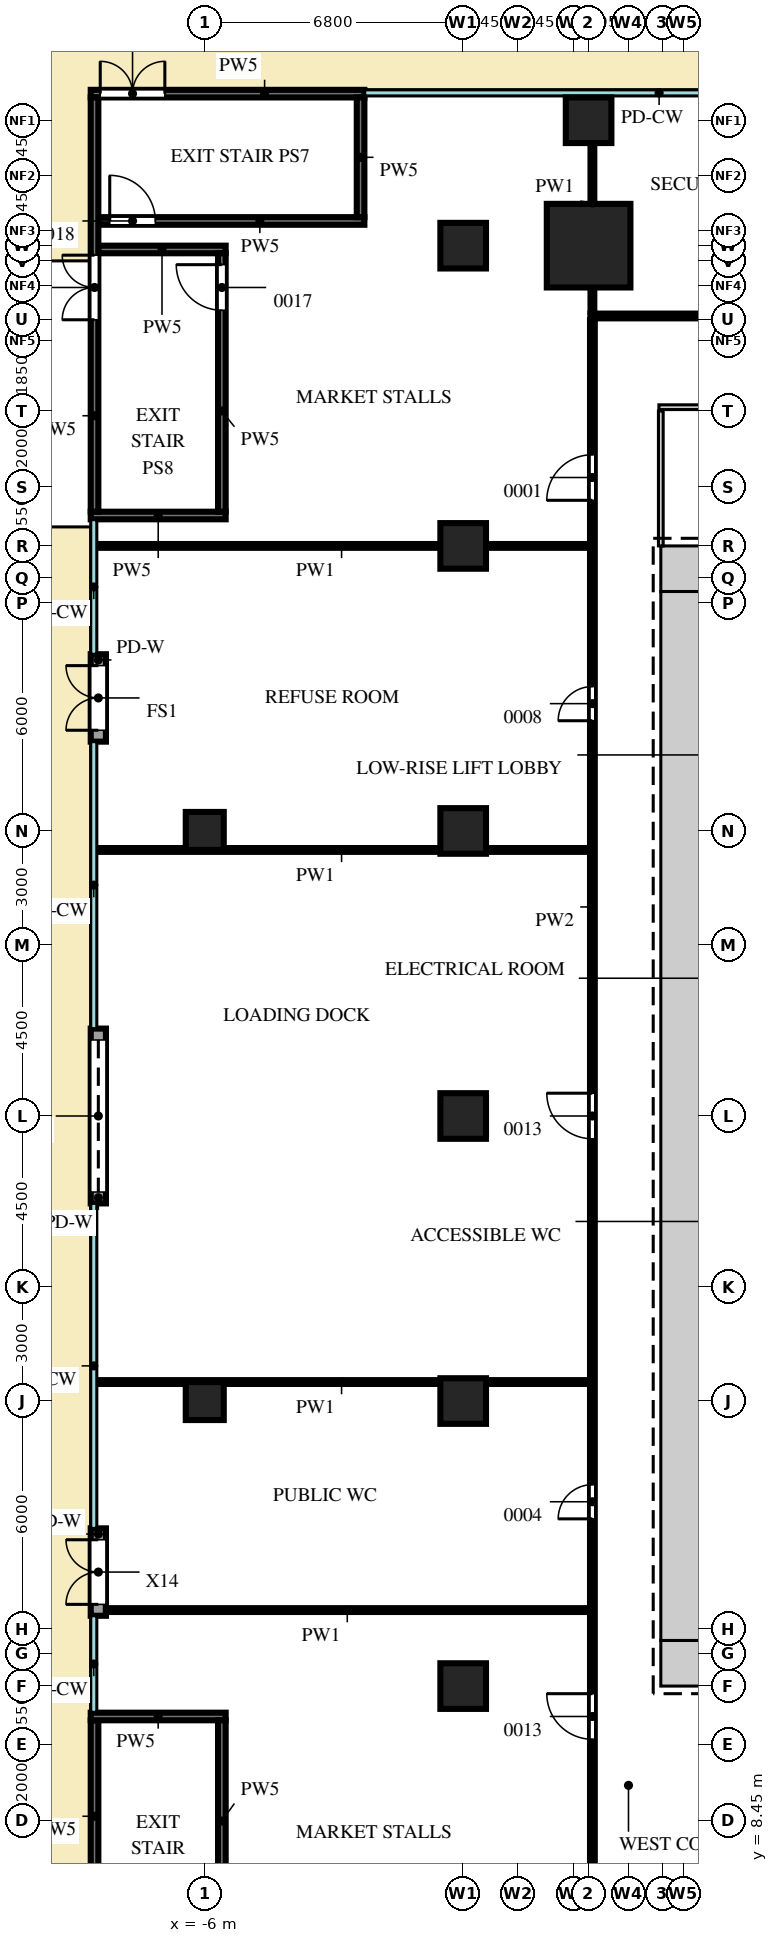
"""IFC4 building model, lengths in metres.
Left out: names, types, materials, properties, quantities, classifications, styles, units other than length and angle.
Written with IfcOpenShell. Run it as: python <this file> out.ifc"""

import sys

from ifc_helpers import new_model, si_unit, direction, frame, frame_2d, origin, origin_2d, place, context, subcontext, project, spatial, rectangle, extrude, source, transform, mapped, element, fill, save


model = new_model("IFC4")
c1 = context("Model", 3, precision=1e-05, world=origin(), true_north=direction((0.0, 1.0)))
c2 = subcontext(c1, "Body", "Model", "MODEL_VIEW")
j1 = project(units=[si_unit("LENGTHUNIT", "METRE"), si_unit("PLANEANGLEUNIT", "RADIAN")], contexts=[c1])
p1 = place(None, origin())
s1 = spatial("IfcSite", under=j1, at=p1, CompositionType="ELEMENT")
p2 = place(p1, origin())
s2 = spatial("IfcBuilding", under=s1, at=p2, CompositionType="ELEMENT")
p3 = place(p2, origin())
s3 = spatial("IfcBuildingStorey", under=s2, at=p3, CompositionType="ELEMENT", Elevation=0.0)
m1 = source(origin(), c2, "Body", "SweptSolid", [
    extrude(rectangle(XDim=1.2, YDim=1.2, at=frame_2d((0.6, 0.0))), origin(), (0.0, 0.0, 1.0), 7.2),
])
for number, where, z_axis, x_axis in (
    (1, (6.0, 41.4, 0.0), (0.0, 0.0, 1.0), (1.0, 0.0, 0.0)),
    (2, (6.0, 12.6, 0.0), (0.0, 0.0, 1.0), (1.0, 0.0, 0.0)),
):
    element("IfcWall", number, at=place(p3, frame(where, z_axis=z_axis, x_axis=x_axis)), inside=s3, PredefinedType="SHEAR", context=c2, shape_type="MappedRepresentation", body=[
        mapped(m1, transform((0.0, 0.0, 0.0))),
    ])
m2 = source(origin(), c2, "Body", "SweptSolid", [
    extrude(rectangle(XDim=27.6, YDim=1.2, at=frame_2d((13.8, 0.0))), origin(), (0.0, 0.0, 1.0), 7.2),
])
p4 = place(p3, frame((6.6, 13.2, 0.0), z_axis=(0.0, 0.0, 1.0), x_axis=(0.0, 1.0, 0.0)))
e3 = element("IfcWall", 3, at=p4, inside=s3, PredefinedType="SHEAR", context=c2, shape_type="MappedRepresentation", body=[
    mapped(m2, transform((0.0, 0.0, 0.0))),
])
m3 = source(origin(), c2, "Body", "SweptSolid", [
    extrude(rectangle(XDim=2.2, YDim=2.2, at=origin_2d()), origin(), (0.0, 0.0, 1.0), 7.2),
])
p5 = place(p3, frame((4.1, 49.9, 0.0), z_axis=(0.0, 0.0, 1.0), x_axis=(1.0, 0.0, 0.0)))
e4 = element("IfcColumn", 4, at=p5, inside=s3, PredefinedType="COLUMN", context=c2, shape_type="MappedRepresentation", body=[
    mapped(m3, transform((0.0, 0.0, 0.0))),
])
m4 = source(origin(), c2, "Body", "SweptSolid", [
    extrude(rectangle(XDim=1.2, YDim=1.2, at=origin_2d()), origin(), (0.0, 0.0, 1.0), 7.2),
])
for number, where, z_axis, x_axis in (
    (5, (4.1, 53.2, 0.0), (0.0, 0.0, 1.0), (1.0, 0.0, 0.0)),
    (6, (0.8, 12.0, 0.0), (0.0, 0.0, 1.0), (1.0, 0.0, 0.0)),
    (7, (0.8, 19.5, 0.0), (0.0, 0.0, 1.0), (1.0, 0.0, 0.0)),
    (8, (0.8, 27.0, 0.0), (0.0, 0.0, 1.0), (1.0, 0.0, 0.0)),
    (9, (0.8, 34.5, 0.0), (0.0, 0.0, 1.0), (1.0, 0.0, 0.0)),
    (10, (0.8, 42.0, 0.0), (0.0, 0.0, 1.0), (1.0, 0.0, 0.0)),
    (11, (0.8, 49.9, 0.0), (0.0, 0.0, 1.0), (1.0, 0.0, 0.0)),
):
    element("IfcColumn", number, at=place(p3, frame(where, z_axis=z_axis, x_axis=x_axis)), inside=s3, PredefinedType="COLUMN", context=c2, shape_type="MappedRepresentation", body=[
        mapped(m4, transform((0.0, 0.0, 0.0))),
    ])
m5 = source(origin(), c2, "Body", "SweptSolid", [
    extrude(rectangle(XDim=1.0, YDim=1.0, at=origin_2d()), origin(), (0.0, 0.0, 1.0), 7.2),
])
for number, where, z_axis, x_axis in (
    (12, (-6.0, 19.5, 0.0), (0.0, 0.0, 1.0), (1.0, 0.0, 0.0)),
    (13, (-6.0, 34.5, 0.0), (0.0, 0.0, 1.0), (1.0, 0.0, 0.0)),
):
    element("IfcColumn", number, at=place(p3, frame(where, z_axis=z_axis, x_axis=x_axis)), inside=s3, PredefinedType="COLUMN", context=c2, shape_type="MappedRepresentation", body=[
        mapped(m5, transform((0.0, 0.0, 0.0))),
    ])
m6 = source(origin(), c2, "Body", "SweptSolid", [
    extrude(rectangle(XDim=2.3, YDim=0.4, at=frame_2d((1.15, 0.0))), origin(), (0.0, 0.0, 1.0), 7.15),
])
p6 = place(p3, frame((-8.8, 39.15, 0.0), z_axis=(0.0, 0.0, 1.0), x_axis=(0.0, -1.0, 0.0)))
e14 = element("IfcWall", 14, at=p6, inside=s3, PredefinedType="SOLIDWALL", context=c2, shape_type="MappedRepresentation", body=[
    mapped(m6, transform((0.0, 0.0, 0.0))),
])
m7 = source(origin(), c2, "Body", "SweptSolid", [
    extrude(rectangle(XDim=1.7, YDim=2.4, at=frame_2d((0.85, 1.2))), frame((0.0, 0.21, 0.0), z_axis=(0.0, -1.0, 0.0), x_axis=(1.0, 0.0, 0.0)), (0.0, 0.0, 1.0), 0.42),
])
p7 = place(p6, frame((2.0, 0.0, 0.0), z_axis=(0.0, 0.0, 1.0), x_axis=(-1.0, 0.0, 0.0)))
e15 = element("IfcOpeningElement", 15, at=p7, cuts=e14, PredefinedType="OPENING", context=c2, shape_type="MappedRepresentation", body=[
    mapped(m7, transform((0.0, 0.0, 0.0))),
])
m8 = source(origin(), c2, "Body", "SweptSolid", [
    extrude(rectangle(XDim=4.6, YDim=0.4, at=frame_2d((2.3, 0.0))), origin(), (0.0, 0.0, 1.0), 7.15),
])
p8 = place(p3, frame((-8.8, 29.3, 0.0), z_axis=(0.0, 0.0, 1.0), x_axis=(0.0, -1.0, 0.0)))
e16 = element("IfcWall", 16, at=p8, inside=s3, PredefinedType="SOLIDWALL", context=c2, shape_type="MappedRepresentation", body=[
    mapped(m8, transform((0.0, 0.0, 0.0))),
])
m9 = source(origin(), c2, "Body", "SweptSolid", [
    extrude(rectangle(XDim=4.0, YDim=4.5, at=frame_2d((2.0, 2.25))), frame((0.0, 0.21, 0.0), z_axis=(0.0, -1.0, 0.0), x_axis=(1.0, 0.0, 0.0)), (0.0, 0.0, 1.0), 0.42),
])
p9 = place(p8, frame((4.3, 0.0, 0.0), z_axis=(0.0, 0.0, 1.0), x_axis=(-1.0, 0.0, 0.0)))
e17 = element("IfcOpeningElement", 17, at=p9, cuts=e16, PredefinedType="OPENING", context=c2, shape_type="MappedRepresentation", body=[
    mapped(m9, transform((0.0, 0.0, 0.0))),
])
p10 = place(p3, frame((-8.8, 16.15, 0.0), z_axis=(0.0, 0.0, 1.0), x_axis=(0.0, -1.0, 0.0)))
e18 = element("IfcWall", 18, at=p10, inside=s3, PredefinedType="SOLIDWALL", context=c2, shape_type="MappedRepresentation", body=[
    mapped(m6, transform((0.0, 0.0, 0.0))),
])
p11 = place(p10, frame((2.0, 0.0, 0.0), z_axis=(0.0, 0.0, 1.0), x_axis=(-1.0, 0.0, 0.0)))
e19 = element("IfcOpeningElement", 19, at=p11, cuts=e18, PredefinedType="OPENING", context=c2, shape_type="MappedRepresentation", body=[
    mapped(m7, transform((0.0, 0.0, 0.0))),
])
m10 = source(origin(), c2, "Body", "SweptSolid", [
    extrude(rectangle(XDim=10.9, YDim=0.2, at=frame_2d((5.45, 0.0))), origin(), (0.0, 0.0, 1.0), 7.2),
])
p12 = place(p3, frame((-8.9, 0.2, 0.0), z_axis=(0.0, 0.0, 1.0), x_axis=(0.0, 1.0, 0.0)))
e20 = element("IfcWall", 20, at=p12, inside=s3, PredefinedType="PARTITIONING", context=c2, shape_type="MappedRepresentation", body=[
    mapped(m10, transform((0.0, 0.0, 0.0))),
])
m11 = source(origin(), c2, "Body", "SweptSolid", [
    extrude(rectangle(XDim=1.7, YDim=2.4, at=frame_2d((0.85, 1.2))), frame((0.0, 0.11, 0.0), z_axis=(0.0, -1.0, 0.0), x_axis=(1.0, 0.0, 0.0)), (0.0, 0.0, 1.0), 0.22),
])
p13 = place(p12, frame((4.15, 0.0, 0.0)))
e21 = element("IfcOpeningElement", 21, at=p13, cuts=e20, PredefinedType="OPENING", context=c2, shape_type="MappedRepresentation", body=[
    mapped(m11, transform((0.0, 0.0, 0.0))),
])
m12 = source(origin(), c2, "Body", "SweptSolid", [
    extrude(rectangle(XDim=3.55, YDim=0.2, at=frame_2d((1.775, 0.0))), origin(), (0.0, 0.0, 1.0), 7.2),
])
p14 = place(p3, frame((-9.0, 11.2, 0.0), z_axis=(0.0, 0.0, 1.0), x_axis=(1.0, 0.0, 0.0)))
e22 = element("IfcWall", 22, at=p14, inside=s3, PredefinedType="PARTITIONING", context=c2, shape_type="MappedRepresentation", body=[
    mapped(m12, transform((0.0, 0.0, 0.0))),
])
m13 = source(origin(), c2, "Body", "SweptSolid", [
    extrude(rectangle(XDim=6.8, YDim=0.2, at=frame_2d((3.4, 0.0))), origin(), (0.0, 0.0, 1.0), 7.2),
])
p15 = place(p3, frame((-5.55, 4.3, 0.0), z_axis=(0.0, 0.0, 1.0), x_axis=(0.0, 1.0, 0.0)))
e23 = element("IfcWall", 23, at=p15, inside=s3, PredefinedType="PARTITIONING", context=c2, shape_type="MappedRepresentation", body=[
    mapped(m13, transform((0.0, 0.0, 0.0))),
])
m14 = source(origin(), c2, "Body", "SweptSolid", [
    extrude(rectangle(XDim=1.2, YDim=2.1, at=frame_2d((0.6, 1.05))), frame((0.0, 0.11, 0.0), z_axis=(0.0, -1.0, 0.0), x_axis=(1.0, 0.0, 0.0)), (0.0, 0.0, 1.0), 0.22),
])
p16 = place(p15, frame((0.3, 0.0, 0.0)))
e24 = element("IfcOpeningElement", 24, at=p16, cuts=e23, PredefinedType="OPENING", context=c2, shape_type="MappedRepresentation", body=[
    mapped(m14, transform((0.0, 0.0, 0.0))),
])
m15 = source(origin(), c2, "Body", "SweptSolid", [
    extrude(rectangle(XDim=7.0, YDim=0.2, at=frame_2d((3.5, 0.0))), origin(), (0.0, 0.0, 1.0), 7.2),
])
p17 = place(p3, frame((-8.8, 50.55, 0.0), z_axis=(0.0, 0.0, 1.0), x_axis=(1.0, 0.0, 0.0)))
e25 = element("IfcWall", 25, at=p17, inside=s3, PredefinedType="PARTITIONING", context=c2, shape_type="MappedRepresentation", body=[
    mapped(m15, transform((0.0, 0.0, 0.0))),
])
p18 = place(p17, frame((0.3, 0.0, 0.0)))
e26 = element("IfcOpeningElement", 26, at=p18, cuts=e25, PredefinedType="OPENING", context=c2, shape_type="MappedRepresentation", body=[
    mapped(m14, transform((0.0, 0.0, 0.0))),
])
m16 = source(origin(), c2, "Body", "SweptSolid", [
    extrude(rectangle(XDim=7.2, YDim=0.2, at=frame_2d((3.6, 0.0))), origin(), (0.0, 0.0, 1.0), 7.2),
])
p19 = place(p3, frame((-9.0, 53.9, 0.0), z_axis=(0.0, 0.0, 1.0), x_axis=(1.0, 0.0, 0.0)))
e27 = element("IfcWall", 27, at=p19, inside=s3, PredefinedType="PARTITIONING", context=c2, shape_type="MappedRepresentation", body=[
    mapped(m16, transform((0.0, 0.0, 0.0))),
])
p20 = place(p19, frame((0.25, 0.0, 0.0)))
e28 = element("IfcOpeningElement", 28, at=p20, cuts=e27, PredefinedType="OPENING", context=c2, shape_type="MappedRepresentation", body=[
    mapped(m11, transform((0.0, 0.0, 0.0))),
])
m17 = source(origin(), c2, "Body", "SweptSolid", [
    extrude(rectangle(XDim=3.15, YDim=0.2, at=frame_2d((1.575, 0.0))), origin(), (0.0, 0.0, 1.0), 7.2),
])
p21 = place(p3, frame((-1.9, 50.65, 0.0), z_axis=(0.0, 0.0, 1.0), x_axis=(0.0, 1.0, 0.0)))
e29 = element("IfcWall", 29, at=p21, inside=s3, PredefinedType="PARTITIONING", context=c2, shape_type="MappedRepresentation", body=[
    mapped(m17, transform((0.0, 0.0, 0.0))),
])
p22 = place(p3, frame((-9.0, 42.8, 0.0), z_axis=(0.0, 0.0, 1.0), x_axis=(1.0, 0.0, 0.0)))
e30 = element("IfcWall", 30, at=p22, inside=s3, PredefinedType="PARTITIONING", context=c2, shape_type="MappedRepresentation", body=[
    mapped(m12, transform((0.0, 0.0, 0.0))),
])
m18 = source(origin(), c2, "Body", "SweptSolid", [
    extrude(rectangle(XDim=3.35, YDim=0.2, at=frame_2d((1.675, 0.0))), origin(), (0.0, 0.0, 1.0), 7.2),
])
p23 = place(p3, frame((-8.8, 49.8, 0.0), z_axis=(0.0, 0.0, 1.0), x_axis=(1.0, 0.0, 0.0)))
e31 = element("IfcWall", 31, at=p23, inside=s3, PredefinedType="PARTITIONING", context=c2, shape_type="MappedRepresentation", body=[
    mapped(m18, transform((0.0, 0.0, 0.0))),
])
p24 = place(p3, frame((-8.9, 42.9, 0.0), z_axis=(0.0, 0.0, 1.0), x_axis=(0.0, 1.0, 0.0)))
e32 = element("IfcWall", 32, at=p24, inside=s3, PredefinedType="PARTITIONING", context=c2, shape_type="MappedRepresentation", body=[
    mapped(m10, transform((0.0, 0.0, 0.0))),
])
p25 = place(p24, frame((5.05, 0.0, 0.0)))
e33 = element("IfcOpeningElement", 33, at=p25, cuts=e32, PredefinedType="OPENING", context=c2, shape_type="MappedRepresentation", body=[
    mapped(m11, transform((0.0, 0.0, 0.0))),
])
p26 = place(p3, frame((-5.55, 42.9, 0.0), z_axis=(0.0, 0.0, 1.0), x_axis=(0.0, 1.0, 0.0)))
e34 = element("IfcWall", 34, at=p26, inside=s3, PredefinedType="PARTITIONING", context=c2, shape_type="MappedRepresentation", body=[
    mapped(m13, transform((0.0, 0.0, 0.0))),
])
p27 = place(p26, frame((5.3, 0.0, 0.0)))
e35 = element("IfcOpeningElement", 35, at=p27, cuts=e34, PredefinedType="OPENING", context=c2, shape_type="MappedRepresentation", body=[
    mapped(m14, transform((0.0, 0.0, 0.0))),
])
m19 = source(origin(), c2, "Body", "SweptSolid", [
    extrude(rectangle(XDim=41.8, YDim=0.125, at=frame_2d((20.9, 0.0))), origin(), (0.0, 0.0, 1.0), 7.2),
])
p28 = place(p3, frame((4.2, 6.15, 0.0), z_axis=(0.0, 0.0, 1.0), x_axis=(0.0, 1.0, 0.0)))
e36 = element("IfcWall", 36, at=p28, inside=s3, PredefinedType="PARTITIONING", context=c2, shape_type="MappedRepresentation", body=[
    mapped(m19, transform((0.0, 0.0, 0.0))),
])
m20 = source(origin(), c2, "Body", "SweptSolid", [
    extrude(rectangle(XDim=1.2, YDim=2.1, at=frame_2d((0.6, 1.05))), frame((0.0, 0.073, 0.0), z_axis=(0.0, -1.0, 0.0), x_axis=(1.0, 0.0, 0.0)), (0.0, 0.0, 1.0), 0.145),
])
p29 = place(p28, frame((4.45, 0.0, 0.0)))
e37 = element("IfcOpeningElement", 37, at=p29, cuts=e36, PredefinedType="OPENING", context=c2, shape_type="MappedRepresentation", body=[
    mapped(m20, transform((0.0, 0.0, 0.0))),
])
m21 = source(origin(), c2, "Body", "SweptSolid", [
    extrude(rectangle(XDim=0.9, YDim=2.1, at=frame_2d((0.45, 1.05))), frame((0.0, 0.073, 0.0), z_axis=(0.0, -1.0, 0.0), x_axis=(1.0, 0.0, 0.0)), (0.0, 0.0, 1.0), 0.145),
])
p30 = place(p28, frame((10.25, 0.0, 0.0)))
e38 = element("IfcOpeningElement", 38, at=p30, cuts=e36, PredefinedType="OPENING", context=c2, shape_type="MappedRepresentation", body=[
    mapped(m21, transform((0.0, 0.0, 0.0))),
])
p31 = place(p28, frame((20.25, 0.0, 0.0)))
e39 = element("IfcOpeningElement", 39, at=p31, cuts=e36, PredefinedType="OPENING", context=c2, shape_type="MappedRepresentation", body=[
    mapped(m20, transform((0.0, 0.0, 0.0))),
])
p32 = place(p28, frame((31.25, 0.0, 0.0)))
e40 = element("IfcOpeningElement", 40, at=p32, cuts=e36, PredefinedType="OPENING", context=c2, shape_type="MappedRepresentation", body=[
    mapped(m21, transform((0.0, 0.0, 0.0))),
])
p33 = place(p28, frame((37.05, 0.0, 0.0)))
e41 = element("IfcOpeningElement", 41, at=p33, cuts=e36, PredefinedType="OPENING", context=c2, shape_type="MappedRepresentation", body=[
    mapped(m20, transform((0.0, 0.0, 0.0))),
])
m22 = source(origin(), c2, "Body", "SweptSolid", [
    extrude(rectangle(XDim=12.7, YDim=0.1, at=frame_2d((6.35, 0.0))), origin(), (0.0, 0.0, 1.0), 7.2),
])
p34 = place(p3, frame((-8.6, 14.0, 0.0), z_axis=(0.0, 0.0, 1.0), x_axis=(1.0, 0.0, 0.0)))
e42 = element("IfcWall", 42, at=p34, inside=s3, PredefinedType="PARTITIONING", context=c2, shape_type="MappedRepresentation", body=[
    mapped(m22, transform((0.0, 0.0, 0.0))),
])
m23 = source(origin(), c2, "Body", "SweptSolid", [
    extrude(rectangle(XDim=13.0, YDim=0.1, at=frame_2d((6.5, 0.0))), origin(), (0.0, 0.0, 1.0), 7.2),
])
for number, where, z_axis, x_axis in (
    (43, (-8.9, 20.0, 0.0), (0.0, 0.0, 1.0), (1.0, 0.0, 0.0)),
    (44, (-8.9, 34.0, 0.0), (0.0, 0.0, 1.0), (1.0, 0.0, 0.0)),
    (45, (-8.9, 42.0, 0.0), (0.0, 0.0, 1.0), (1.0, 0.0, 0.0)),
):
    element("IfcWall", number, at=place(p3, frame(where, z_axis=z_axis, x_axis=x_axis)), inside=s3, PredefinedType="PARTITIONING", context=c2, shape_type="MappedRepresentation", body=[
        mapped(m23, transform((0.0, 0.0, 0.0))),
    ])
m24 = source(origin(), c2, "Body", "SweptSolid", [
    extrude(rectangle(XDim=3.55, YDim=0.125, at=frame_2d((1.775, 0.0))), origin(), (0.0, 0.0, 1.0), 7.2),
])
p35 = place(p3, frame((6.0, 42.0, 0.0), z_axis=(0.0, 0.0, 1.0), x_axis=(0.0, 1.0, 0.0)))
e46 = element("IfcWall", 46, at=p35, inside=s3, PredefinedType="PARTITIONING", context=c2, shape_type="MappedRepresentation", body=[
    mapped(m24, transform((0.0, 0.0, 0.0))),
])
m25 = source(origin(), c2, "Body", "SweptSolid", [
    extrude(rectangle(XDim=7.95, YDim=0.125, at=frame_2d((3.975, 0.0))), origin(), (0.0, 0.0, 1.0), 7.2),
])
p36 = place(p3, frame((5.95, 45.65, 0.0), z_axis=(0.0, 0.0, 1.0), x_axis=(1.0, 0.0, 0.0)))
e47 = element("IfcWall", 47, at=p36, inside=s3, PredefinedType="PARTITIONING", context=c2, shape_type="MappedRepresentation", body=[
    mapped(m25, transform((0.0, 0.0, 0.0))),
])
p37 = place(p36, frame((3.55, 0.0, 0.0)))
e48 = element("IfcOpeningElement", 48, at=p37, cuts=e47, PredefinedType="OPENING", context=c2, shape_type="MappedRepresentation", body=[
    mapped(m21, transform((0.0, 0.0, 0.0))),
])
m26 = source(origin(), c2, "Body", "SweptSolid", [
    extrude(rectangle(XDim=9.55, YDim=0.125, at=frame_2d((4.775, 0.0))), origin(), (0.0, 0.0, 1.0), 7.2),
])
p38 = place(p3, frame((4.15, 48.05, 0.0), z_axis=(0.0, 0.0, 1.0), x_axis=(1.0, 0.0, 0.0)))
e49 = element("IfcWall", 49, at=p38, inside=s3, PredefinedType="PARTITIONING", context=c2, shape_type="MappedRepresentation", body=[
    mapped(m26, transform((0.0, 0.0, 0.0))),
])
p39 = place(p38, frame((4.25, 0.0, 0.0)))
e50 = element("IfcOpeningElement", 50, at=p39, cuts=e49, PredefinedType="OPENING", context=c2, shape_type="MappedRepresentation", body=[
    mapped(m21, transform((0.0, 0.0, 0.0))),
])
m27 = source(origin(), c2, "Body", "SweptSolid", [
    extrude(rectangle(XDim=5.75, YDim=0.1, at=frame_2d((2.875, 0.0))), origin(), (0.0, 0.0, 1.0), 7.2),
])
p40 = place(p3, frame((4.2, 48.15, 0.0), z_axis=(0.0, 0.0, 1.0), x_axis=(0.0, 1.0, 0.0)))
e51 = element("IfcWall", 51, at=p40, inside=s3, PredefinedType="PARTITIONING", context=c2, shape_type="MappedRepresentation", body=[
    mapped(m27, transform((0.0, 0.0, 0.0))),
])
m28 = source(origin(), c2, "Body", "SweptSolid", [
    extrude(rectangle(XDim=1.7, YDim=2.4, at=frame_2d((0.85, 1.2))), frame((0.0, 0.025, 0.0), z_axis=(0.0, -1.0, 0.0), x_axis=(1.0, 0.0, 0.0)), (0.0, 0.0, 1.0), 0.05),
])
p41 = place(p7, origin())
e52 = element("IfcDoor", 52, at=p41, inside=s3, OperationType="DOUBLE_DOOR_SINGLE_SWING", PredefinedType="DOOR", context=c2, shape_type="MappedRepresentation", body=[
    mapped(m28, transform((0.0, 0.0, 0.0))),
])
fill(e15, e52)
m29 = source(origin(), c2, "Body", "SweptSolid", [
    extrude(rectangle(XDim=4.0, YDim=4.5, at=frame_2d((2.0, 2.25))), frame((0.0, 0.025, 0.0), z_axis=(0.0, -1.0, 0.0), x_axis=(1.0, 0.0, 0.0)), (0.0, 0.0, 1.0), 0.05),
])
p42 = place(p9, origin())
e53 = element("IfcDoor", 53, at=p42, inside=s3, OperationType="ROLLINGUP", PredefinedType="GATE", context=c2, shape_type="MappedRepresentation", body=[
    mapped(m29, transform((0.0, 0.0, 0.0))),
])
fill(e17, e53)
p43 = place(p11, origin())
e54 = element("IfcDoor", 54, at=p43, inside=s3, OperationType="DOUBLE_DOOR_SINGLE_SWING", PredefinedType="DOOR", context=c2, shape_type="MappedRepresentation", body=[
    mapped(m28, transform((0.0, 0.0, 0.0))),
])
fill(e19, e54)
m30 = source(origin(), c2, "Body", "SweptSolid", [
    extrude(rectangle(XDim=1.2, YDim=2.1, at=frame_2d((0.6, 1.05))), frame((0.0, 0.025, 0.0), z_axis=(0.0, -1.0, 0.0), x_axis=(1.0, 0.0, 0.0)), (0.0, 0.0, 1.0), 0.05),
])
p44 = place(p29, origin())
e55 = element("IfcDoor", 55, at=p44, inside=s3, OperationType="SINGLE_SWING_LEFT", PredefinedType="DOOR", context=c2, shape_type="MappedRepresentation", body=[
    mapped(m30, transform((0.0, 0.0, 0.0))),
])
fill(e37, e55)
m31 = source(origin(), c2, "Body", "SweptSolid", [
    extrude(rectangle(XDim=0.9, YDim=2.1, at=frame_2d((0.45, 1.05))), frame((0.0, 0.025, 0.0), z_axis=(0.0, -1.0, 0.0), x_axis=(1.0, 0.0, 0.0)), (0.0, 0.0, 1.0), 0.05),
])
p45 = place(p30, origin())
e56 = element("IfcDoor", 56, at=p45, inside=s3, OperationType="SINGLE_SWING_RIGHT", PredefinedType="DOOR", context=c2, shape_type="MappedRepresentation", body=[
    mapped(m31, transform((0.0, 0.0, 0.0))),
])
fill(e38, e56)
p46 = place(p31, origin())
e57 = element("IfcDoor", 57, at=p46, inside=s3, OperationType="SINGLE_SWING_LEFT", PredefinedType="DOOR", context=c2, shape_type="MappedRepresentation", body=[
    mapped(m30, transform((0.0, 0.0, 0.0))),
])
fill(e39, e57)
p47 = place(p32, origin())
e58 = element("IfcDoor", 58, at=p47, inside=s3, OperationType="SINGLE_SWING_RIGHT", PredefinedType="DOOR", context=c2, shape_type="MappedRepresentation", body=[
    mapped(m31, transform((0.0, 0.0, 0.0))),
])
fill(e40, e58)
p48 = place(p33, origin())
e59 = element("IfcDoor", 59, at=p48, inside=s3, OperationType="SINGLE_SWING_RIGHT", PredefinedType="DOOR", context=c2, shape_type="MappedRepresentation", body=[
    mapped(m30, transform((0.0, 0.0, 0.0))),
])
fill(e41, e59)
p49 = place(p18, origin())
e60 = element("IfcDoor", 60, at=p49, inside=s3, OperationType="SINGLE_SWING_RIGHT", PredefinedType="DOOR", context=c2, shape_type="MappedRepresentation", body=[
    mapped(m30, transform((0.0, 0.0, 0.0))),
])
fill(e26, e60)
p50 = place(p27, origin())
e61 = element("IfcDoor", 61, at=p50, inside=s3, OperationType="SINGLE_SWING_LEFT", PredefinedType="DOOR", context=c2, shape_type="MappedRepresentation", body=[
    mapped(m30, transform((0.0, 0.0, 0.0))),
])
fill(e35, e61)
p51 = place(p20, origin())
e62 = element("IfcDoor", 62, at=p51, inside=s3, OperationType="DOUBLE_DOOR_SINGLE_SWING", PredefinedType="DOOR", context=c2, shape_type="MappedRepresentation", body=[
    mapped(m28, transform((0.0, 0.0, 0.0))),
])
fill(e28, e62)
p52 = place(p25, origin())
e63 = element("IfcDoor", 63, at=p52, inside=s3, OperationType="DOUBLE_DOOR_SINGLE_SWING", PredefinedType="DOOR", context=c2, shape_type="MappedRepresentation", body=[
    mapped(m28, transform((0.0, 0.0, 0.0))),
])
fill(e33, e63)
save(model, sys.argv[1])
